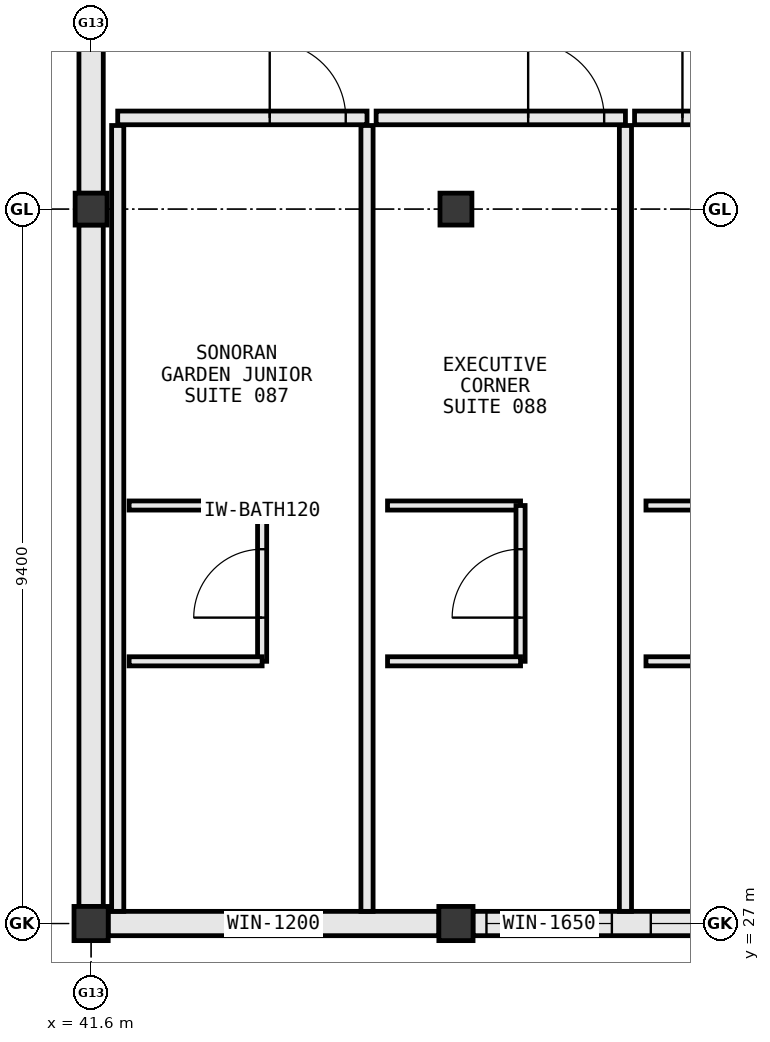
"""IFC4 building model, lengths in metres.
Left out: names, types, materials, properties, quantities, classifications, styles, units other than length and angle.
Written with IfcOpenShell. Run it as: python <this file> out.ifc"""

import sys

from ifc_helpers import new_model, si_unit, direction, frame, frame_2d, origin, origin_2d, place, context, subcontext, project, spatial, rectangle, extrude, element, fill, save


model = new_model("IFC4")
c1 = context("Model", 3, precision=1e-05, world=origin(), true_north=direction((0.0, 1.0)))
c2 = subcontext(c1, "Body", "Model", "MODEL_VIEW")
j1 = project(units=[si_unit("LENGTHUNIT", "METRE"), si_unit("PLANEANGLEUNIT", "RADIAN")], contexts=[c1])
p1 = place(None, origin())
s1 = spatial("IfcSite", under=j1, at=p1, CompositionType="ELEMENT")
p2 = place(p1, origin())
s2 = spatial("IfcBuilding", under=s1, at=p2, CompositionType="ELEMENT")
p3 = place(p2, frame((0.0, 0.0, 16.2)))
s3 = spatial("IfcBuildingStorey", under=s2, at=p3, CompositionType="ELEMENT", Elevation=16.2)
p4 = place(p3, frame((41.6, 27.0, 0.0), z_axis=(0.0, 0.0, 1.0), x_axis=(1.0, 0.0, 0.0)))
e1 = element("IfcColumn", 1, at=p4, inside=s3, PredefinedType="COLUMN", context=c2, shape_type="SweptSolid", body=[
    extrude(rectangle(XDim=0.45, YDim=0.45, at=origin_2d()), origin(), (0.0, 0.0, 1.0), 3.8),
])
p5 = place(p3, frame((41.6, 36.4, 0.0), z_axis=(0.0, 0.0, 1.0), x_axis=(1.0, 0.0, 0.0)))
e2 = element("IfcColumn", 2, at=p5, inside=s3, PredefinedType="COLUMN", context=c2, shape_type="SweptSolid", body=[
    extrude(rectangle(XDim=0.42, YDim=0.42, at=origin_2d()), origin(), (0.0, 0.0, 1.0), 3.8),
])
p6 = place(p3, frame((46.4, 27.0, 0.0), z_axis=(0.0, 0.0, 1.0), x_axis=(1.0, 0.0, 0.0)))
e3 = element("IfcColumn", 3, at=p6, inside=s3, PredefinedType="COLUMN", context=c2, shape_type="SweptSolid", body=[
    extrude(rectangle(XDim=0.45, YDim=0.45, at=origin_2d()), origin(), (0.0, 0.0, 1.0), 3.8),
])
p7 = place(p3, frame((46.4, 36.4, 0.0), z_axis=(0.0, 0.0, 1.0), x_axis=(1.0, 0.0, 0.0)))
e4 = element("IfcColumn", 4, at=p7, inside=s3, PredefinedType="COLUMN", context=c2, shape_type="SweptSolid", body=[
    extrude(rectangle(XDim=0.42, YDim=0.42, at=origin_2d()), origin(), (0.0, 0.0, 1.0), 3.8),
])
p8 = place(p3, frame((41.6, 46.992, 0.0), z_axis=(0.0, 0.0, 1.0), x_axis=(0.0, -1.0, 0.0)))
e5 = element("IfcWall", 5, at=p8, inside=s3, PredefinedType="STANDARD", context=c2, shape_type="SweptSolid", body=[
    extrude(rectangle(XDim=10.384, YDim=0.32, at=frame_2d((5.192, 0.0))), origin(), (0.0, 0.0, 1.0), 2.915),
])
p9 = place(p3, frame((41.6, 36.192, 0.0), z_axis=(0.0, 0.0, 1.0), x_axis=(0.0, -1.0, 0.0)))
e6 = element("IfcWall", 6, at=p9, inside=s3, PredefinedType="STANDARD", context=c2, shape_type="SweptSolid", body=[
    extrude(rectangle(XDim=8.969, YDim=0.32, at=frame_2d((4.484, 0.0))), origin(), (0.0, 0.0, 1.0), 2.935),
])
p10 = place(p3, frame((41.823, 27.0, 0.0), z_axis=(0.0, 0.0, 1.0), x_axis=(1.0, 0.0, 0.0)))
e7 = element("IfcWall", 7, at=p10, inside=s3, PredefinedType="STANDARD", context=c2, shape_type="SweptSolid", body=[
    extrude(rectangle(XDim=4.354, YDim=0.32, at=frame_2d((2.177, 0.0))), origin(), (0.0, 0.0, 1.0), 3.015),
])
p11 = place(p10, frame((1.577, 0.0, 0.85)))
e8 = element("IfcOpeningElement", 8, at=p11, cuts=e7, PredefinedType="OPENING", context=c2, shape_type="SweptSolid", body=[
    extrude(rectangle(XDim=1.2, YDim=1.55, at=frame_2d((0.6, 0.775))), frame((0.0, 0.172, 0.0), z_axis=(0.0, -1.0, 0.0), x_axis=(1.0, 0.0, 0.0)), (0.0, 0.0, 1.0), 0.344),
])
p12 = place(p3, frame((46.623, 27.0, 0.0), z_axis=(0.0, 0.0, 1.0), x_axis=(1.0, 0.0, 0.0)))
e9 = element("IfcWall", 9, at=p12, inside=s3, PredefinedType="STANDARD", context=c2, shape_type="SweptSolid", body=[
    extrude(rectangle(XDim=4.354, YDim=0.32, at=frame_2d((2.177, 0.0))), origin(), (0.0, 0.0, 1.0), 3.015),
])
p13 = place(p12, frame((0.178, 0.0, 0.85)))
e10 = element("IfcOpeningElement", 10, at=p13, cuts=e9, PredefinedType="OPENING", context=c2, shape_type="SweptSolid", body=[
    extrude(rectangle(XDim=1.65, YDim=1.8, at=frame_2d((0.825, 0.9))), frame((0.0, 0.172, 0.0), z_axis=(0.0, -1.0, 0.0), x_axis=(1.0, 0.0, 0.0)), (0.0, 0.0, 1.0), 0.344),
])
p14 = place(p12, frame((2.341, 0.0, 0.85)))
e11 = element("IfcOpeningElement", 11, at=p14, cuts=e9, PredefinedType="OPENING", context=c2, shape_type="SweptSolid", body=[
    extrude(rectangle(XDim=1.8, YDim=1.85, at=frame_2d((0.9, 0.925))), frame((0.0, 0.172, 0.0), z_axis=(0.0, -1.0, 0.0), x_axis=(1.0, 0.0, 0.0)), (0.0, 0.0, 1.0), 0.344),
])
p15 = place(p3, frame((45.23, 37.6, 0.0), z_axis=(0.0, 0.0, 1.0), x_axis=(-1.0, 0.0, 0.0)))
e12 = element("IfcWall", 12, at=p15, inside=s3, PredefinedType="PARTITIONING", context=c2, shape_type="SweptSolid", body=[
    extrude(rectangle(XDim=3.28, YDim=0.18, at=frame_2d((1.64, 0.0))), origin(), (0.0, 0.0, 1.0), 3.56),
])
p16 = place(p15, frame((0.28, 0.0, 0.0)))
e13 = element("IfcOpeningElement", 13, at=p16, cuts=e12, PredefinedType="OPENING", context=c2, shape_type="SweptSolid", body=[
    extrude(rectangle(XDim=1.0, YDim=2.2, at=frame_2d((0.5, 1.1))), frame((0.0, 0.102, 0.0), z_axis=(0.0, -1.0, 0.0), x_axis=(1.0, 0.0, 0.0)), (0.0, 0.0, 1.0), 0.204),
])
p17 = place(p3, frame((41.95, 27.16, 0.0), z_axis=(0.0, 0.0, 1.0), x_axis=(0.0, 1.0, 0.0)))
e14 = element("IfcWall", 14, at=p17, inside=s3, PredefinedType="PARTITIONING", context=c2, shape_type="SweptSolid", body=[
    extrude(rectangle(XDim=10.34, YDim=0.16, at=frame_2d((5.17, 0.0))), origin(), (0.0, 0.0, 1.0), 2.915),
])
p18 = place(p3, frame((45.23, 27.16, 0.0), z_axis=(0.0, 0.0, 1.0), x_axis=(0.0, 1.0, 0.0)))
e15 = element("IfcWall", 15, at=p18, inside=s3, PredefinedType="PARTITIONING", context=c2, shape_type="SweptSolid", body=[
    extrude(rectangle(XDim=10.34, YDim=0.16, at=frame_2d((5.17, 0.0))), origin(), (0.0, 0.0, 1.0), 3.56),
])
p19 = place(p3, frame((42.1, 32.5, 0.0), z_axis=(0.0, 0.0, 1.0), x_axis=(1.0, 0.0, 0.0)))
e16 = element("IfcWall", 16, at=p19, inside=s3, PredefinedType="PARTITIONING", context=c2, shape_type="SweptSolid", body=[
    extrude(rectangle(XDim=1.75, YDim=0.12, at=frame_2d((0.875, 0.0))), origin(), (0.0, 0.0, 1.0), 3.56),
])
p20 = place(p3, frame((43.85, 30.45, 0.0), z_axis=(0.0, 0.0, 1.0), x_axis=(0.0, 1.0, 0.0)))
e17 = element("IfcWall", 17, at=p20, inside=s3, PredefinedType="PARTITIONING", context=c2, shape_type="SweptSolid", body=[
    extrude(rectangle(XDim=2.05, YDim=0.12, at=frame_2d((1.025, 0.0))), origin(), (0.0, 0.0, 1.0), 3.105),
])
p21 = place(p20, frame((0.575, 0.0, 0.0)))
e18 = element("IfcOpeningElement", 18, at=p21, cuts=e17, PredefinedType="OPENING", context=c2, shape_type="SweptSolid", body=[
    extrude(rectangle(XDim=0.9, YDim=2.15, at=frame_2d((0.45, 1.075))), frame((0.0, 0.072, 0.0), z_axis=(0.0, -1.0, 0.0), x_axis=(1.0, 0.0, 0.0)), (0.0, 0.0, 1.0), 0.144),
])
p22 = place(p3, frame((42.1, 30.45, 0.0), z_axis=(0.0, 0.0, 1.0), x_axis=(1.0, 0.0, 0.0)))
e19 = element("IfcWall", 19, at=p22, inside=s3, PredefinedType="PARTITIONING", context=c2, shape_type="SweptSolid", body=[
    extrude(rectangle(XDim=1.75, YDim=0.12, at=frame_2d((0.875, 0.0))), origin(), (0.0, 0.0, 1.0), 3.56),
])
p23 = place(p3, frame((48.63, 37.6, 0.0), z_axis=(0.0, 0.0, 1.0), x_axis=(-1.0, 0.0, 0.0)))
e20 = element("IfcWall", 20, at=p23, inside=s3, PredefinedType="PARTITIONING", context=c2, shape_type="SweptSolid", body=[
    extrude(rectangle(XDim=3.28, YDim=0.18, at=frame_2d((1.64, 0.0))), origin(), (0.0, 0.0, 1.0), 3.56),
])
p24 = place(p23, frame((0.28, 0.0, 0.0)))
e21 = element("IfcOpeningElement", 21, at=p24, cuts=e20, PredefinedType="OPENING", context=c2, shape_type="SweptSolid", body=[
    extrude(rectangle(XDim=1.0, YDim=2.2, at=frame_2d((0.5, 1.1))), frame((0.0, 0.102, 0.0), z_axis=(0.0, -1.0, 0.0), x_axis=(1.0, 0.0, 0.0)), (0.0, 0.0, 1.0), 0.204),
])
p25 = place(p3, frame((48.63, 27.16, 0.0), z_axis=(0.0, 0.0, 1.0), x_axis=(0.0, 1.0, 0.0)))
e22 = element("IfcWall", 22, at=p25, inside=s3, PredefinedType="PARTITIONING", context=c2, shape_type="SweptSolid", body=[
    extrude(rectangle(XDim=10.34, YDim=0.16, at=frame_2d((5.17, 0.0))), origin(), (0.0, 0.0, 1.0), 3.06),
])
p26 = place(p3, frame((45.5, 32.5, 0.0), z_axis=(0.0, 0.0, 1.0), x_axis=(1.0, 0.0, 0.0)))
e23 = element("IfcWall", 23, at=p26, inside=s3, PredefinedType="PARTITIONING", context=c2, shape_type="SweptSolid", body=[
    extrude(rectangle(XDim=1.75, YDim=0.12, at=frame_2d((0.875, 0.0))), origin(), (0.0, 0.0, 1.0), 3.56),
])
p27 = place(p3, frame((47.25, 30.45, 0.0), z_axis=(0.0, 0.0, 1.0), x_axis=(0.0, 1.0, 0.0)))
e24 = element("IfcWall", 24, at=p27, inside=s3, PredefinedType="PARTITIONING", context=c2, shape_type="SweptSolid", body=[
    extrude(rectangle(XDim=2.05, YDim=0.12, at=frame_2d((1.025, 0.0))), origin(), (0.0, 0.0, 1.0), 3.56),
])
p28 = place(p27, frame((0.575, 0.0, 0.0)))
e25 = element("IfcOpeningElement", 25, at=p28, cuts=e24, PredefinedType="OPENING", context=c2, shape_type="SweptSolid", body=[
    extrude(rectangle(XDim=0.9, YDim=2.15, at=frame_2d((0.45, 1.075))), frame((0.0, 0.072, 0.0), z_axis=(0.0, -1.0, 0.0), x_axis=(1.0, 0.0, 0.0)), (0.0, 0.0, 1.0), 0.144),
])
p29 = place(p3, frame((45.5, 30.45, 0.0), z_axis=(0.0, 0.0, 1.0), x_axis=(1.0, 0.0, 0.0)))
e26 = element("IfcWall", 26, at=p29, inside=s3, PredefinedType="PARTITIONING", context=c2, shape_type="SweptSolid", body=[
    extrude(rectangle(XDim=1.75, YDim=0.12, at=frame_2d((0.875, 0.0))), origin(), (0.0, 0.0, 1.0), 3.56),
])
p30 = place(p3, frame((52.03, 37.6, 0.0), z_axis=(0.0, 0.0, 1.0), x_axis=(-1.0, 0.0, 0.0)))
e27 = element("IfcWall", 27, at=p30, inside=s3, PredefinedType="PARTITIONING", context=c2, shape_type="SweptSolid", body=[
    extrude(rectangle(XDim=3.28, YDim=0.18, at=frame_2d((1.64, 0.0))), origin(), (0.0, 0.0, 1.0), 3.56),
])
p31 = place(p30, frame((1.65, 0.0, 0.0)))
e28 = element("IfcOpeningElement", 28, at=p31, cuts=e27, PredefinedType="OPENING", context=c2, shape_type="SweptSolid", body=[
    extrude(rectangle(XDim=1.0, YDim=2.2, at=frame_2d((0.5, 1.1))), frame((0.0, 0.102, 0.0), z_axis=(0.0, -1.0, 0.0), x_axis=(1.0, 0.0, 0.0)), (0.0, 0.0, 1.0), 0.204),
])
for number, where, z_axis, x_axis in (
    (29, (48.9, 32.5, 0.0), (0.0, 0.0, 1.0), (1.0, 0.0, 0.0)),
    (30, (48.9, 30.45, 0.0), (0.0, 0.0, 1.0), (1.0, 0.0, 0.0)),
):
    element("IfcWall", number, at=place(p3, frame(where, z_axis=z_axis, x_axis=x_axis)), inside=s3, PredefinedType="PARTITIONING", context=c2, shape_type="SweptSolid", body=[
        extrude(rectangle(XDim=1.75, YDim=0.12, at=frame_2d((0.875, 0.0))), origin(), (0.0, 0.0, 1.0), 3.56),
    ])
p32 = place(p11, origin())
e31 = element("IfcWindow", 31, at=p32, inside=s3, PartitioningType="SINGLE_PANEL", PredefinedType="WINDOW", context=c2, shape_type="SweptSolid", body=[
    extrude(rectangle(XDim=1.2, YDim=1.55, at=frame_2d((0.6, 0.775))), frame((0.0, 0.03, 0.0), z_axis=(0.0, -1.0, 0.0), x_axis=(1.0, 0.0, 0.0)), (0.0, 0.0, 1.0), 0.06),
])
fill(e8, e31)
p33 = place(p13, origin())
e32 = element("IfcWindow", 32, at=p33, inside=s3, PartitioningType="SINGLE_PANEL", PredefinedType="WINDOW", context=c2, shape_type="SweptSolid", body=[
    extrude(rectangle(XDim=1.65, YDim=1.8, at=frame_2d((0.825, 0.9))), frame((0.0, 0.03, 0.0), z_axis=(0.0, -1.0, 0.0), x_axis=(1.0, 0.0, 0.0)), (0.0, 0.0, 1.0), 0.06),
])
fill(e10, e32)
p34 = place(p14, origin())
e33 = element("IfcWindow", 33, at=p34, inside=s3, PartitioningType="SINGLE_PANEL", PredefinedType="WINDOW", context=c2, shape_type="SweptSolid", body=[
    extrude(rectangle(XDim=1.8, YDim=1.85, at=frame_2d((0.9, 0.925))), frame((0.0, 0.03, 0.0), z_axis=(0.0, -1.0, 0.0), x_axis=(1.0, 0.0, 0.0)), (0.0, 0.0, 1.0), 0.06),
])
fill(e11, e33)
p35 = place(p16, frame((1.0, 0.0, 0.0), z_axis=(0.0, 0.0, 1.0), x_axis=(-1.0, 0.0, 0.0)))
e34 = element("IfcDoor", 34, at=p35, inside=s3, OperationType="SINGLE_SWING_RIGHT", PredefinedType="DOOR", context=c2, shape_type="SweptSolid", body=[
    extrude(rectangle(XDim=1.0, YDim=2.2, at=frame_2d((0.5, 1.1))), frame((0.0, 0.025, 0.0), z_axis=(0.0, -1.0, 0.0), x_axis=(1.0, 0.0, 0.0)), (0.0, 0.0, 1.0), 0.05),
])
fill(e13, e34)
p36 = place(p21, origin())
e35 = element("IfcDoor", 35, at=p36, inside=s3, OperationType="SINGLE_SWING_LEFT", PredefinedType="DOOR", context=c2, shape_type="SweptSolid", body=[
    extrude(rectangle(XDim=0.9, YDim=2.15, at=frame_2d((0.45, 1.075))), frame((0.0, 0.025, 0.0), z_axis=(0.0, -1.0, 0.0), x_axis=(1.0, 0.0, 0.0)), (0.0, 0.0, 1.0), 0.05),
])
fill(e18, e35)
p37 = place(p24, frame((1.0, 0.0, 0.0), z_axis=(0.0, 0.0, 1.0), x_axis=(-1.0, 0.0, 0.0)))
e36 = element("IfcDoor", 36, at=p37, inside=s3, OperationType="SINGLE_SWING_RIGHT", PredefinedType="DOOR", context=c2, shape_type="SweptSolid", body=[
    extrude(rectangle(XDim=1.0, YDim=2.2, at=frame_2d((0.5, 1.1))), frame((0.0, 0.025, 0.0), z_axis=(0.0, -1.0, 0.0), x_axis=(1.0, 0.0, 0.0)), (0.0, 0.0, 1.0), 0.05),
])
fill(e21, e36)
p38 = place(p28, origin())
e37 = element("IfcDoor", 37, at=p38, inside=s3, OperationType="SINGLE_SWING_LEFT", PredefinedType="DOOR", context=c2, shape_type="SweptSolid", body=[
    extrude(rectangle(XDim=0.9, YDim=2.15, at=frame_2d((0.45, 1.075))), frame((0.0, 0.025, 0.0), z_axis=(0.0, -1.0, 0.0), x_axis=(1.0, 0.0, 0.0)), (0.0, 0.0, 1.0), 0.05),
])
fill(e25, e37)
p39 = place(p31, frame((1.0, 0.0, 0.0), z_axis=(0.0, 0.0, 1.0), x_axis=(-1.0, 0.0, 0.0)))
e38 = element("IfcDoor", 38, at=p39, inside=s3, OperationType="SINGLE_SWING_RIGHT", PredefinedType="DOOR", context=c2, shape_type="SweptSolid", body=[
    extrude(rectangle(XDim=1.0, YDim=2.2, at=frame_2d((0.5, 1.1))), frame((0.0, 0.025, 0.0), z_axis=(0.0, -1.0, 0.0), x_axis=(1.0, 0.0, 0.0)), (0.0, 0.0, 1.0), 0.05),
])
fill(e28, e38)
save(model, sys.argv[1])
